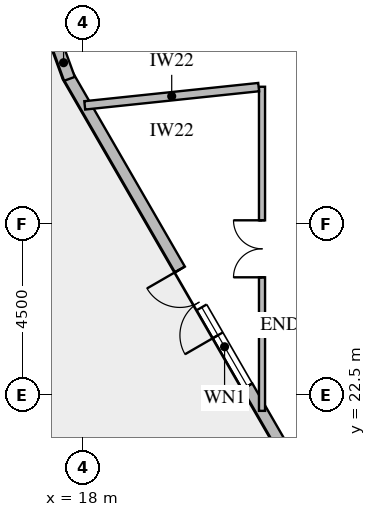
"""IFC4 building model, lengths in metres.
Left out: names, types, materials, properties, quantities, classifications, styles, units other than length and angle.
Written with IfcOpenShell. Run it as: python <this file> out.ifc"""

import sys

from ifc_helpers import new_model, si_unit, direction, frame, frame_2d, origin, place, context, subcontext, project, spatial, rectangle, extrude, element, fill, save


model = new_model("IFC4")
c1 = context("Model", 3, precision=1e-05, world=origin(), true_north=direction((0.0, 1.0)))
c2 = subcontext(c1, "Body", "Model", "MODEL_VIEW")
j1 = project(units=[si_unit("LENGTHUNIT", "METRE"), si_unit("PLANEANGLEUNIT", "RADIAN")], contexts=[c1])
p1 = place(None, origin())
s1 = spatial("IfcSite", under=j1, at=p1, CompositionType="ELEMENT")
p2 = place(p1, origin())
s2 = spatial("IfcBuilding", under=s1, at=p2, CompositionType="ELEMENT")
p3 = place(p2, origin())
s3 = spatial("IfcBuildingStorey", under=s2, at=p3, CompositionType="ELEMENT", Elevation=0.0)
p4 = place(p3, frame((25.858, 16.611, 0.0), z_axis=(0.0, 0.0, 1.0), x_axis=(-0.49999847728, 0.866026282926, 0.0)))
e1 = element("IfcWall", 1, at=p4, inside=s3, PredefinedType="SOLIDWALL", context=c2, shape_type="SweptSolid", body=[
    extrude(rectangle(XDim=16.512, YDim=0.3, at=frame_2d((8.256, 0.0))), origin(), (0.0, 0.0, 1.0), 5.95),
])
p5 = place(p4, frame((8.606, 0.0, 0.0)))
e2 = element("IfcOpeningElement", 2, at=p5, cuts=e1, PredefinedType="OPENING", context=c2, shape_type="SweptSolid", body=[
    extrude(rectangle(XDim=2.0, YDim=2.5, at=frame_2d((1.0, 1.25))), frame((0.0, 0.162, 0.0), z_axis=(0.0, -1.0, 0.0), x_axis=(1.0, 0.0, 0.0)), (0.0, 0.0, 1.0), 0.324),
])
p6 = place(p4, frame((7.056, 0.0, 4.5)))
e3 = element("IfcOpeningElement", 3, at=p6, cuts=e1, PredefinedType="OPENING", context=c2, shape_type="SweptSolid", body=[
    extrude(rectangle(XDim=2.4, YDim=1.6, at=frame_2d((1.2, 0.8))), frame((0.0, 0.162, 0.0), z_axis=(0.0, -1.0, 0.0), x_axis=(1.0, 0.0, 0.0)), (0.0, 0.0, 1.0), 0.324),
])
p7 = place(p3, frame((17.648, 30.812, 0.0), z_axis=(0.0, 0.0, 1.0), x_axis=(-0.342198422728, 0.939627713237, 0.0)))
e4 = element("IfcWall", 4, at=p7, inside=s3, PredefinedType="SOLIDWALL", context=c2, shape_type="SweptSolid", body=[
    extrude(rectangle(XDim=0.904, YDim=0.3, at=frame_2d((0.452, 0.0))), origin(), (0.0, 0.0, 1.0), 7.35),
])
p8 = place(p3, frame((22.715, 30.604, 0.0), z_axis=(0.0, 0.0, 1.0), x_axis=(0.0, -1.0, 0.0)))
e5 = element("IfcWall", 5, at=p8, inside=s3, PredefinedType="PARTITIONING", context=c2, shape_type="SweptSolid", body=[
    extrude(rectangle(XDim=8.529, YDim=0.16, at=frame_2d((4.264, 0.0))), origin(), (0.0, 0.0, 1.0), 5.95),
])
p9 = place(p8, frame((3.514, 0.0, 0.0)))
e6 = element("IfcOpeningElement", 6, at=p9, cuts=e5, PredefinedType="OPENING", context=c2, shape_type="SweptSolid", body=[
    extrude(rectangle(XDim=1.5, YDim=2.15, at=frame_2d((0.75, 1.075))), frame((0.0, 0.092, 0.0), z_axis=(0.0, -1.0, 0.0), x_axis=(1.0, 0.0, 0.0)), (0.0, 0.0, 1.0), 0.184),
])
p10 = place(p3, frame((22.627, 30.594, 0.0), z_axis=(0.0, 0.0, 1.0), x_axis=(-0.994522302342, -0.104524591102, 0.0)))
e7 = element("IfcWall", 7, at=p10, inside=s3, PredefinedType="PARTITIONING", context=c2, shape_type="SweptSolid", body=[
    extrude(rectangle(XDim=4.601, YDim=0.22, at=frame_2d((2.301, 0.0))), origin(), (0.0, 0.0, 1.0), 7.35),
])
p11 = place(p5, origin())
e8 = element("IfcDoor", 8, at=p11, inside=s3, OperationType="DOUBLE_DOOR_SINGLE_SWING", PredefinedType="DOOR", context=c2, shape_type="SweptSolid", body=[
    extrude(rectangle(XDim=2.0, YDim=2.5, at=frame_2d((1.0, 1.25))), frame((0.0, 0.025, 0.0), z_axis=(0.0, -1.0, 0.0), x_axis=(1.0, 0.0, 0.0)), (0.0, 0.0, 1.0), 0.05),
])
fill(e2, e8)
p12 = place(p6, origin())
e9 = element("IfcWindow", 9, at=p12, inside=s3, PartitioningType="SINGLE_PANEL", PredefinedType="WINDOW", context=c2, shape_type="SweptSolid", body=[
    extrude(rectangle(XDim=2.4, YDim=1.6, at=frame_2d((1.2, 0.8))), frame((0.0, 0.03, 0.0), z_axis=(0.0, -1.0, 0.0), x_axis=(1.0, 0.0, 0.0)), (0.0, 0.0, 1.0), 0.06),
])
fill(e3, e9)
p13 = place(p9, frame((1.5, 0.0, 0.0), z_axis=(0.0, 0.0, 1.0), x_axis=(-1.0, 0.0, 0.0)))
e10 = element("IfcDoor", 10, at=p13, inside=s3, OperationType="DOUBLE_DOOR_SINGLE_SWING", PredefinedType="DOOR", context=c2, shape_type="SweptSolid", body=[
    extrude(rectangle(XDim=1.5, YDim=2.15, at=frame_2d((0.75, 1.075))), frame((0.0, 0.025, 0.0), z_axis=(0.0, -1.0, 0.0), x_axis=(1.0, 0.0, 0.0)), (0.0, 0.0, 1.0), 0.05),
])
fill(e6, e10)
save(model, sys.argv[1])
